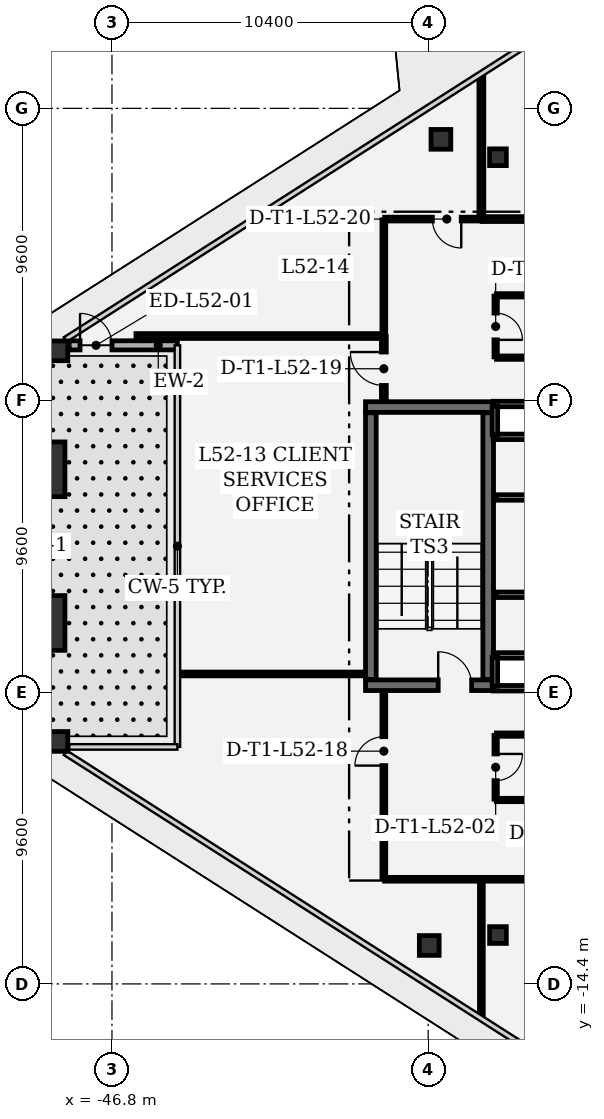
"""IFC4 building model, lengths in metres.
Left out: names, types, materials, properties, quantities, classifications, styles, units other than length and angle.
Written with IfcOpenShell. Run it as: python <this file> out.ifc"""

import sys

from ifc_helpers import new_model, si_unit, direction, frame, frame_2d, origin, origin_2d, place, context, subcontext, project, spatial, rectangle, extrude, element, fill, save


model = new_model("IFC4")
c1 = context("Model", 3, precision=1e-05, world=origin(), true_north=direction((0.0, 1.0)))
c2 = subcontext(c1, "Body", "Model", "MODEL_VIEW")
j1 = project(units=[si_unit("LENGTHUNIT", "METRE"), si_unit("PLANEANGLEUNIT", "RADIAN")], contexts=[c1])
p1 = place(None, origin())
s1 = spatial("IfcSite", under=j1, at=p1, CompositionType="ELEMENT")
p2 = place(p1, origin())
s2 = spatial("IfcBuilding", under=s1, at=p2, CompositionType="ELEMENT")
p3 = place(p2, frame((0.0, 0.0, 225.3)))
s3 = spatial("IfcBuildingStorey", under=s2, at=p3, CompositionType="ELEMENT", Elevation=225.3)
for number, where, z_axis, x_axis in (
    (1, (-49.172, 2.528, 0.0), (0.0, 0.0, 1.0), (1.0, 0.0, 0.0)),
    (2, (-49.172, -2.528, 0.0), (0.0, 0.0, 1.0), (1.0, 0.0, 0.0)),
):
    element("IfcColumn", number, at=place(p3, frame(where, z_axis=z_axis, x_axis=x_axis)), inside=s3, PredefinedType="COLUMN", context=c2, shape_type="SweptSolid", body=[
        extrude(rectangle(XDim=1.65, YDim=1.8, at=origin_2d()), origin(), (0.0, 0.0, 1.0), 4.05),
    ])
for number, where, z_axis, x_axis in (
    (3, (-48.578, 6.425, 0.0), (0.0, 0.0, 1.0), (1.0, 0.0, 0.0)),
    (4, (-48.578, -6.425, 0.0), (0.0, 0.0, 1.0), (1.0, 0.0, 0.0)),
    (5, (-35.981, 13.381, 0.0), (0.0, 0.0, 1.0), (1.0, 0.0, 0.0)),
    (6, (-36.365, -13.135, 0.0), (0.0, 0.0, 1.0), (1.0, 0.0, 0.0)),
):
    element("IfcColumn", number, at=place(p3, frame(where, z_axis=z_axis, x_axis=x_axis)), inside=s3, PredefinedType="COLUMN", context=c2, shape_type="SweptSolid", body=[
        extrude(rectangle(XDim=0.65, YDim=0.65, at=origin_2d()), origin(), (0.0, 0.0, 1.0), 4.05),
    ])
for number, where, z_axis, x_axis in (
    (7, (-34.104, 12.792, 0.0), (0.0, 0.0, 1.0), (1.0, 0.0, 0.0)),
    (8, (-34.104, -12.792, 0.0), (0.0, 0.0, 1.0), (1.0, 0.0, 0.0)),
):
    element("IfcColumn", number, at=place(p3, frame(where, z_axis=z_axis, x_axis=x_axis)), inside=s3, PredefinedType="COLUMN", context=c2, shape_type="SweptSolid", body=[
        extrude(rectangle(XDim=0.55, YDim=0.55, at=origin_2d()), origin(), (0.0, 0.0, 1.0), 4.05),
    ])
p4 = place(p3, frame((-48.208, 6.604, 0.0), z_axis=(0.0, 0.0, 1.0), x_axis=(1.0, 0.0, 0.0)))
e9 = element("IfcWall", 9, at=p4, inside=s3, PredefinedType="SOLIDWALL", context=c2, shape_type="SweptSolid", body=[
    extrude(rectangle(XDim=3.561, YDim=0.3, at=frame_2d((1.78, 0.0))), origin(), (0.0, 0.0, 1.0), 3.78),
])
p5 = place(p4, frame((0.359, 0.0, 0.0)))
e10 = element("IfcOpeningElement", 10, at=p5, cuts=e9, PredefinedType="OPENING", context=c2, shape_type="SweptSolid", body=[
    extrude(rectangle(XDim=1.05, YDim=2.2, at=frame_2d((0.525, 1.1))), frame((0.0, 0.16, 0.0), z_axis=(0.0, -1.0, 0.0), x_axis=(1.0, 0.0, 0.0)), (0.0, 0.0, 1.0), 0.32),
])
p6 = place(p3, frame((-38.46, -4.575, 0.0), z_axis=(0.0, 0.0, 1.0), x_axis=(1.0, 0.0, 0.0)))
e11 = element("IfcWall", 11, at=p6, inside=s3, PredefinedType="SHEAR", context=c2, shape_type="SweptSolid", body=[
    extrude(rectangle(XDim=4.21, YDim=0.35, at=frame_2d((2.105, 0.0))), origin(), (0.0, 0.0, 1.0), 3.78),
])
p7 = place(p6, frame((2.39, 0.0, 0.0)))
e12 = element("IfcOpeningElement", 12, at=p7, cuts=e11, PredefinedType="OPENING", context=c2, shape_type="SweptSolid", body=[
    extrude(rectangle(XDim=1.1, YDim=2.2, at=frame_2d((0.55, 1.1))), frame((0.0, 0.185, 0.0), z_axis=(0.0, -1.0, 0.0), x_axis=(1.0, 0.0, 0.0)), (0.0, 0.0, 1.0), 0.37),
])
p8 = place(p3, frame((-34.25, 4.575, 0.0), z_axis=(0.0, 0.0, 1.0), x_axis=(-1.0, 0.0, 0.0)))
e13 = element("IfcWall", 13, at=p8, inside=s3, PredefinedType="SHEAR", context=c2, shape_type="SweptSolid", body=[
    extrude(rectangle(XDim=4.21, YDim=0.35, at=frame_2d((2.105, 0.0))), origin(), (0.0, 0.0, 1.0), 3.78),
])
for number, where, z_axis, x_axis in (
    (14, (-34.425, -4.385, 0.0), (0.0, 0.0, 1.0), (0.0, 1.0, 0.0)),
    (15, (-38.285, 4.385, 0.0), (0.0, 0.0, 1.0), (0.0, -1.0, 0.0)),
):
    element("IfcWall", number, at=place(p3, frame(where, z_axis=z_axis, x_axis=x_axis)), inside=s3, PredefinedType="SHEAR", context=c2, shape_type="SweptSolid", body=[
        extrude(rectangle(XDim=8.77, YDim=0.35, at=frame_2d((4.385, 0.0))), origin(), (0.0, 0.0, 1.0), 3.78),
    ])
for number, where, z_axis, x_axis in (
    (16, (-32.99, 3.595, 0.0), (0.0, 0.0, 1.0), (-1.0, 0.0, 0.0)),
    (17, (-34.26, 4.675, 0.0), (0.0, 0.0, 1.0), (1.0, 0.0, 0.0)),
):
    element("IfcWall", number, at=place(p3, frame(where, z_axis=z_axis, x_axis=x_axis)), inside=s3, PredefinedType="PARTITIONING", context=c2, shape_type="SweptSolid", body=[
        extrude(rectangle(XDim=1.27, YDim=0.18, at=frame_2d((0.635, 0.0))), origin(), (0.0, 0.0, 1.0), 3.78),
    ])
p9 = place(p3, frame((-34.205, 3.66, 0.0), z_axis=(0.0, 0.0, 1.0), x_axis=(0.0, 1.0, 0.0)))
e18 = element("IfcWall", 18, at=p9, inside=s3, PredefinedType="PARTITIONING", context=c2, shape_type="SweptSolid", body=[
    extrude(rectangle(XDim=0.95, YDim=0.18, at=frame_2d((0.475, 0.0))), origin(), (0.0, 0.0, 1.0), 3.78),
])
for number, where, z_axis, x_axis in (
    (19, (-32.99, -4.675, 0.0), (0.0, 0.0, 1.0), (-1.0, 0.0, 0.0)),
    (20, (-34.26, -3.595, 0.0), (0.0, 0.0, 1.0), (1.0, 0.0, 0.0)),
):
    element("IfcWall", number, at=place(p3, frame(where, z_axis=z_axis, x_axis=x_axis)), inside=s3, PredefinedType="PARTITIONING", context=c2, shape_type="SweptSolid", body=[
        extrude(rectangle(XDim=1.27, YDim=0.18, at=frame_2d((0.635, 0.0))), origin(), (0.0, 0.0, 1.0), 3.78),
    ])
p10 = place(p3, frame((-34.205, -4.61, 0.0), z_axis=(0.0, 0.0, 1.0), x_axis=(0.0, 1.0, 0.0)))
e21 = element("IfcWall", 21, at=p10, inside=s3, PredefinedType="PARTITIONING", context=c2, shape_type="SweptSolid", body=[
    extrude(rectangle(XDim=0.95, YDim=0.18, at=frame_2d((0.475, 0.0))), origin(), (0.0, 0.0, 1.0), 3.78),
])
p11 = place(p3, frame((-34.18, 8.225, 0.0), z_axis=(0.0, 0.0, 1.0), x_axis=(0.0, -1.0, 0.0)))
e22 = element("IfcWall", 22, at=p11, inside=s3, PredefinedType="PARTITIONING", context=c2, shape_type="SweptSolid", body=[
    extrude(rectangle(XDim=2.0, YDim=0.11, at=frame_2d((1.0, 0.0))), origin(), (0.0, 0.0, 1.0), 3.78),
])
p12 = place(p11, frame((0.56, 0.0, 0.0)))
e23 = element("IfcOpeningElement", 23, at=p12, cuts=e22, PredefinedType="OPENING", context=c2, shape_type="SweptSolid", body=[
    extrude(rectangle(XDim=0.88, YDim=2.1, at=frame_2d((0.44, 1.05))), frame((0.0, 0.065, 0.0), z_axis=(0.0, -1.0, 0.0), x_axis=(1.0, 0.0, 0.0)), (0.0, 0.0, 1.0), 0.13),
])
p13 = place(p3, frame((-34.155, 6.2, 0.0), z_axis=(0.0, 0.0, 1.0), x_axis=(1.0, 0.0, 0.0)))
e24 = element("IfcWall", 24, at=p13, inside=s3, PredefinedType="PARTITIONING", context=c2, shape_type="SweptSolid", body=[
    extrude(rectangle(XDim=3.25, YDim=0.11, at=frame_2d((1.625, 0.0))), origin(), (0.0, 0.0, 1.0), 3.344),
])
p14 = place(p3, frame((-30.905, 8.25, 0.0), z_axis=(0.0, 0.0, 1.0), x_axis=(-1.0, 0.0, 0.0)))
e25 = element("IfcWall", 25, at=p14, inside=s3, PredefinedType="PARTITIONING", context=c2, shape_type="SweptSolid", body=[
    extrude(rectangle(XDim=3.25, YDim=0.11, at=frame_2d((1.625, 0.0))), origin(), (0.0, 0.0, 1.0), 3.78),
])
p15 = place(p3, frame((-34.18, -6.225, 0.0), z_axis=(0.0, 0.0, 1.0), x_axis=(0.0, -1.0, 0.0)))
e26 = element("IfcWall", 26, at=p15, inside=s3, PredefinedType="PARTITIONING", context=c2, shape_type="SweptSolid", body=[
    extrude(rectangle(XDim=2.1, YDim=0.11, at=frame_2d((1.05, 0.0))), origin(), (0.0, 0.0, 1.0), 3.78),
])
p16 = place(p15, frame((0.61, 0.0, 0.0)))
e27 = element("IfcOpeningElement", 27, at=p16, cuts=e26, PredefinedType="OPENING", context=c2, shape_type="SweptSolid", body=[
    extrude(rectangle(XDim=0.88, YDim=2.1, at=frame_2d((0.44, 1.05))), frame((0.0, 0.065, 0.0), z_axis=(0.0, -1.0, 0.0), x_axis=(1.0, 0.0, 0.0)), (0.0, 0.0, 1.0), 0.13),
])
for number, where, z_axis, x_axis in (
    (28, (-34.155, -8.35, 0.0), (0.0, 0.0, 1.0), (1.0, 0.0, 0.0)),
    (29, (-30.905, -6.2, 0.0), (0.0, 0.0, 1.0), (-1.0, 0.0, 0.0)),
):
    element("IfcWall", number, at=place(p3, frame(where, z_axis=z_axis, x_axis=x_axis)), inside=s3, PredefinedType="PARTITIONING", context=c2, shape_type="SweptSolid", body=[
        extrude(rectangle(XDim=3.25, YDim=0.11, at=frame_2d((1.625, 0.0))), origin(), (0.0, 0.0, 1.0), 3.344),
    ])
p17 = place(p3, frame((-34.155, 1.6, 0.0), z_axis=(0.0, 0.0, 1.0), x_axis=(1.0, 0.0, 0.0)))
e30 = element("IfcWall", 30, at=p17, inside=s3, PredefinedType="PARTITIONING", context=c2, shape_type="SweptSolid", body=[
    extrude(rectangle(XDim=3.25, YDim=0.18, at=frame_2d((1.625, 0.0))), origin(), (0.0, 0.0, 1.0), 3.78),
])
p18 = place(p17, frame((1.185, 0.0, 0.0)))
e31 = element("IfcOpeningElement", 31, at=p18, cuts=e30, PredefinedType="OPENING", context=c2, shape_type="SweptSolid", body=[
    extrude(rectangle(XDim=0.88, YDim=2.1, at=frame_2d((0.44, 1.05))), frame((0.0, 0.1, 0.0), z_axis=(0.0, -1.0, 0.0), x_axis=(1.0, 0.0, 0.0)), (0.0, 0.0, 1.0), 0.2),
])
p19 = place(p3, frame((-30.905, -1.6, 0.0), z_axis=(0.0, 0.0, 1.0), x_axis=(-1.0, 0.0, 0.0)))
e32 = element("IfcWall", 32, at=p19, inside=s3, PredefinedType="PARTITIONING", context=c2, shape_type="SweptSolid", body=[
    extrude(rectangle(XDim=3.25, YDim=0.18, at=frame_2d((1.625, 0.0))), origin(), (0.0, 0.0, 1.0), 3.78),
])
p20 = place(p19, frame((1.185, 0.0, 0.0)))
e33 = element("IfcOpeningElement", 33, at=p20, cuts=e32, PredefinedType="OPENING", context=c2, shape_type="SweptSolid", body=[
    extrude(rectangle(XDim=0.88, YDim=2.1, at=frame_2d((0.44, 1.05))), frame((0.0, 0.1, 0.0), z_axis=(0.0, -1.0, 0.0), x_axis=(1.0, 0.0, 0.0)), (0.0, 0.0, 1.0), 0.2),
])
p21 = place(p3, frame((-34.625, 10.758, 0.0), z_axis=(0.0, 0.0, 1.0), x_axis=(1.0, 0.0, 0.0)))
e34 = element("IfcWall", 34, at=p21, inside=s3, PredefinedType="PARTITIONING", context=c2, shape_type="SweptSolid", body=[
    extrude(rectangle(XDim=4.861, YDim=0.16, at=frame_2d((2.431, 0.0))), origin(), (0.0, 0.0, 1.0), 3.0),
])
p22 = place(p21, frame((1.881, 0.0, 0.0)))
e35 = element("IfcOpeningElement", 35, at=p22, cuts=e34, PredefinedType="OPENING", context=c2, shape_type="SweptSolid", body=[
    extrude(rectangle(XDim=1.1, YDim=2.15, at=frame_2d((0.55, 1.075))), frame((0.0, 0.09, 0.0), z_axis=(0.0, -1.0, 0.0), x_axis=(1.0, 0.0, 0.0)), (0.0, 0.0, 1.0), 0.18),
])
p23 = place(p3, frame((-34.65, 15.462, 0.0), z_axis=(0.0, 0.0, 1.0), x_axis=(0.0, -1.0, 0.0)))
e36 = element("IfcWall", 36, at=p23, inside=s3, PredefinedType="PARTITIONING", context=c2, shape_type="SweptSolid", body=[
    extrude(rectangle(XDim=4.679, YDim=0.16, at=frame_2d((2.339, 0.0))), origin(), (0.0, 0.0, 1.0), 3.78),
])
p24 = place(p3, frame((-28.836, -10.958, 0.0), z_axis=(0.0, 0.0, 1.0), x_axis=(-1.0, 0.0, 0.0)))
e37 = element("IfcWall", 37, at=p24, inside=s3, PredefinedType="PARTITIONING", context=c2, shape_type="SweptSolid", body=[
    extrude(rectangle(XDim=5.789, YDim=0.125, at=frame_2d((2.895, 0.0))), origin(), (0.0, 0.0, 1.0), 3.0),
])
p25 = place(p24, frame((2.419, 0.0, 0.0)))
e38 = element("IfcOpeningElement", 38, at=p25, cuts=e37, PredefinedType="OPENING", context=c2, shape_type="SweptSolid", body=[
    extrude(rectangle(XDim=0.95, YDim=2.15, at=frame_2d((0.475, 1.075))), frame((0.0, 0.073, 0.0), z_axis=(0.0, -1.0, 0.0), x_axis=(1.0, 0.0, 0.0)), (0.0, 0.0, 1.0), 0.145),
])
p26 = place(p3, frame((-34.65, -10.983, 0.0), z_axis=(0.0, 0.0, 1.0), x_axis=(0.0, -1.0, 0.0)))
e39 = element("IfcWall", 39, at=p26, inside=s3, PredefinedType="PARTITIONING", context=c2, shape_type="SweptSolid", body=[
    extrude(rectangle(XDim=4.479, YDim=0.125, at=frame_2d((2.24, 0.0))), origin(), (0.0, 0.0, 1.0), 3.78),
])
p27 = place(p3, frame((-37.833, -10.958, 0.0), z_axis=(0.0, 0.0, 1.0), x_axis=(1.0, 0.0, 0.0)))
e40 = element("IfcWall", 40, at=p27, inside=s3, PredefinedType="PARTITIONING", context=c2, shape_type="SweptSolid", body=[
    extrude(rectangle(XDim=3.15, YDim=0.125, at=frame_2d((1.575, 0.0))), origin(), (0.0, 0.0, 1.0), 3.0),
])
p28 = place(p3, frame((-37.858, -10.933, 0.0), z_axis=(0.0, 0.0, 1.0), x_axis=(0.0, 1.0, 0.0)))
e41 = element("IfcWall", 41, at=p28, inside=s3, PredefinedType="PARTITIONING", context=c2, shape_type="SweptSolid", body=[
    extrude(rectangle(XDim=6.15, YDim=0.125, at=frame_2d((3.075, 0.0))), origin(), (0.0, 0.0, 1.0), 3.78),
])
p29 = place(p28, frame((3.714, 0.0, 0.0)))
e42 = element("IfcOpeningElement", 42, at=p29, cuts=e41, PredefinedType="OPENING", context=c2, shape_type="SweptSolid", body=[
    extrude(rectangle(XDim=0.95, YDim=2.15, at=frame_2d((0.475, 1.075))), frame((0.0, 0.073, 0.0), z_axis=(0.0, -1.0, 0.0), x_axis=(1.0, 0.0, 0.0)), (0.0, 0.0, 1.0), 0.145),
])
p30 = place(p3, frame((-38.493, -4.205, 0.0), z_axis=(0.0, 0.0, 1.0), x_axis=(-1.0, 0.0, 0.0)))
e43 = element("IfcWall", 43, at=p30, inside=s3, PredefinedType="PARTITIONING", context=c2, shape_type="SweptSolid", body=[
    extrude(rectangle(XDim=6.075, YDim=0.125, at=frame_2d((3.038, 0.0))), origin(), (0.0, 0.0, 1.0), 3.78),
])
p31 = place(p3, frame((-37.858, 4.783, 0.0), z_axis=(0.0, 0.0, 1.0), x_axis=(0.0, 1.0, 0.0)))
e44 = element("IfcWall", 44, at=p31, inside=s3, PredefinedType="PARTITIONING", context=c2, shape_type="SweptSolid", body=[
    extrude(rectangle(XDim=2.103, YDim=0.16, at=frame_2d((1.051, 0.0))), origin(), (0.0, 0.0, 1.0), 3.78),
])
p32 = place(p31, frame((0.501, 0.0, 0.0)))
e45 = element("IfcOpeningElement", 45, at=p32, cuts=e44, PredefinedType="OPENING", context=c2, shape_type="SweptSolid", body=[
    extrude(rectangle(XDim=1.1, YDim=2.15, at=frame_2d((0.55, 1.075))), frame((0.0, 0.09, 0.0), z_axis=(0.0, -1.0, 0.0), x_axis=(1.0, 0.0, 0.0)), (0.0, 0.0, 1.0), 0.18),
])
p33 = place(p3, frame((-37.883, 6.911, 0.0), z_axis=(0.0, 0.0, 1.0), x_axis=(-1.0, 0.0, 0.0)))
e46 = element("IfcWall", 46, at=p33, inside=s3, PredefinedType="PARTITIONING", context=c2, shape_type="SweptSolid", body=[
    extrude(rectangle(XDim=8.128, YDim=0.16, at=frame_2d((4.064, 0.0))), origin(), (0.0, 0.0, 1.0), 3.0),
])
p34 = place(p3, frame((-37.858, 6.944, 0.0), z_axis=(0.0, 0.0, 1.0), x_axis=(0.0, 1.0, 0.0)))
e47 = element("IfcWall", 47, at=p34, inside=s3, PredefinedType="PARTITIONING", context=c2, shape_type="SweptSolid", body=[
    extrude(rectangle(XDim=3.79, YDim=0.125, at=frame_2d((1.895, 0.0))), origin(), (0.0, 0.0, 1.0), 3.78),
])
p35 = place(p3, frame((-34.683, 10.758, 0.0), z_axis=(0.0, 0.0, 1.0), x_axis=(-1.0, 0.0, 0.0)))
e48 = element("IfcWall", 48, at=p35, inside=s3, PredefinedType="PARTITIONING", context=c2, shape_type="SweptSolid", body=[
    extrude(rectangle(XDim=3.15, YDim=0.125, at=frame_2d((1.575, 0.0))), origin(), (0.0, 0.0, 1.0), 3.0),
])
p36 = place(p35, frame((0.629, 0.0, 0.0)))
e49 = element("IfcOpeningElement", 49, at=p36, cuts=e48, PredefinedType="OPENING", context=c2, shape_type="SweptSolid", body=[
    extrude(rectangle(XDim=0.95, YDim=2.15, at=frame_2d((0.475, 1.075))), frame((0.0, 0.073, 0.0), z_axis=(0.0, -1.0, 0.0), x_axis=(1.0, 0.0, 0.0)), (0.0, 0.0, 1.0), 0.145),
])
p37 = place(p5, origin())
e50 = element("IfcDoor", 50, at=p37, inside=s3, OperationType="SINGLE_SWING_LEFT", PredefinedType="DOOR", context=c2, shape_type="SweptSolid", body=[
    extrude(rectangle(XDim=1.05, YDim=2.2, at=frame_2d((0.525, 1.1))), frame((0.0, 0.025, 0.0), z_axis=(0.0, -1.0, 0.0), x_axis=(1.0, 0.0, 0.0)), (0.0, 0.0, 1.0), 0.05),
])
fill(e10, e50)
p38 = place(p7, origin())
e51 = element("IfcDoor", 51, at=p38, inside=s3, OperationType="SINGLE_SWING_LEFT", PredefinedType="DOOR", context=c2, shape_type="SweptSolid", body=[
    extrude(rectangle(XDim=1.1, YDim=2.2, at=frame_2d((0.55, 1.1))), frame((0.0, 0.025, 0.0), z_axis=(0.0, -1.0, 0.0), x_axis=(1.0, 0.0, 0.0)), (0.0, 0.0, 1.0), 0.05),
])
fill(e12, e51)
p39 = place(p12, origin())
e52 = element("IfcDoor", 52, at=p39, inside=s3, OperationType="SINGLE_SWING_RIGHT", PredefinedType="DOOR", context=c2, shape_type="SweptSolid", body=[
    extrude(rectangle(XDim=0.88, YDim=2.1, at=frame_2d((0.44, 1.05))), frame((0.0, 0.025, 0.0), z_axis=(0.0, -1.0, 0.0), x_axis=(1.0, 0.0, 0.0)), (0.0, 0.0, 1.0), 0.05),
])
fill(e23, e52)
p40 = place(p16, origin())
e53 = element("IfcDoor", 53, at=p40, inside=s3, OperationType="SINGLE_SWING_LEFT", PredefinedType="DOOR", context=c2, shape_type="SweptSolid", body=[
    extrude(rectangle(XDim=0.88, YDim=2.1, at=frame_2d((0.44, 1.05))), frame((0.0, 0.025, 0.0), z_axis=(0.0, -1.0, 0.0), x_axis=(1.0, 0.0, 0.0)), (0.0, 0.0, 1.0), 0.05),
])
fill(e27, e53)
p41 = place(p29, origin())
e54 = element("IfcDoor", 54, at=p41, inside=s3, OperationType="SINGLE_SWING_LEFT", PredefinedType="DOOR", context=c2, shape_type="SweptSolid", body=[
    extrude(rectangle(XDim=0.95, YDim=2.15, at=frame_2d((0.475, 1.075))), frame((0.0, 0.025, 0.0), z_axis=(0.0, -1.0, 0.0), x_axis=(1.0, 0.0, 0.0)), (0.0, 0.0, 1.0), 0.05),
])
fill(e42, e54)
p42 = place(p32, origin())
e55 = element("IfcDoor", 55, at=p42, inside=s3, OperationType="SINGLE_SWING_RIGHT", PredefinedType="DOOR", context=c2, shape_type="SweptSolid", body=[
    extrude(rectangle(XDim=1.1, YDim=2.15, at=frame_2d((0.55, 1.075))), frame((0.0, 0.025, 0.0), z_axis=(0.0, -1.0, 0.0), x_axis=(1.0, 0.0, 0.0)), (0.0, 0.0, 1.0), 0.05),
])
fill(e45, e55)
p43 = place(p36, origin())
e56 = element("IfcDoor", 56, at=p43, inside=s3, OperationType="SINGLE_SWING_LEFT", PredefinedType="DOOR", context=c2, shape_type="SweptSolid", body=[
    extrude(rectangle(XDim=0.95, YDim=2.15, at=frame_2d((0.475, 1.075))), frame((0.0, 0.025, 0.0), z_axis=(0.0, -1.0, 0.0), x_axis=(1.0, 0.0, 0.0)), (0.0, 0.0, 1.0), 0.05),
])
fill(e49, e56)
save(model, sys.argv[1])
